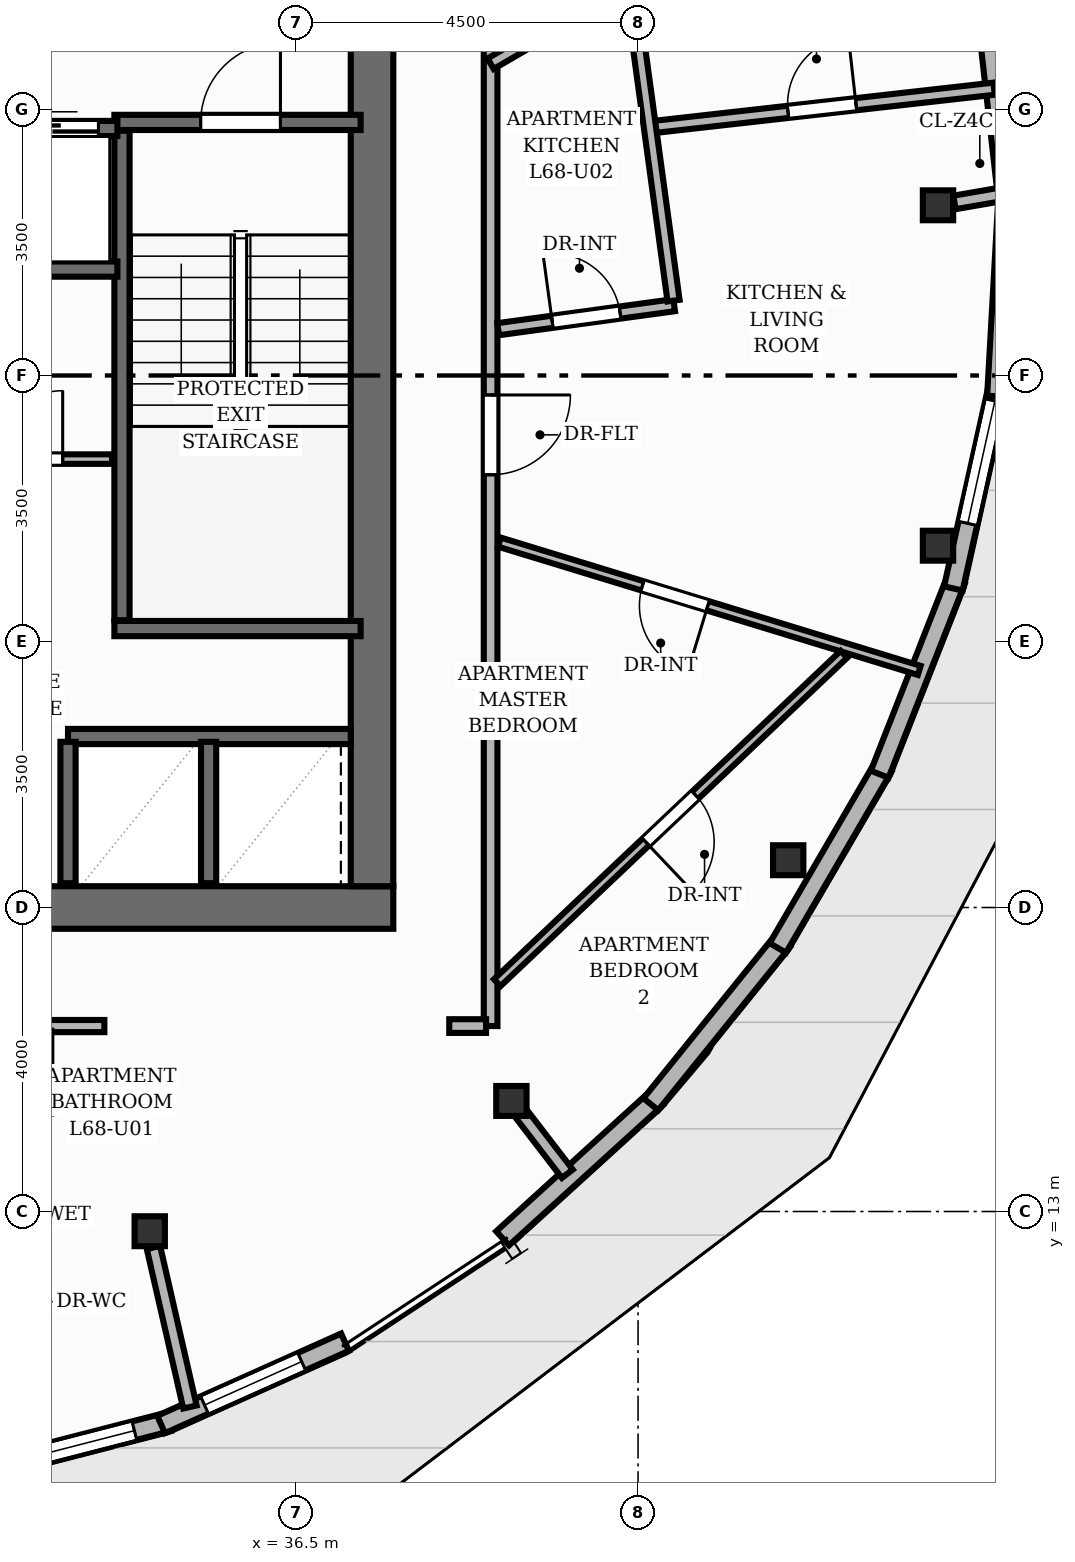
"""IFC4 building model, lengths in metres.
Left out: names, types, materials, properties, quantities, classifications, styles, units other than length and angle.
Written with IfcOpenShell. Run it as: python <this file> out.ifc"""

import sys

from ifc_helpers import new_model, si_unit, direction, frame, frame_2d, origin, origin_2d, place, context, subcontext, project, spatial, rectangle, i_section, extrude, element, fill, save


model = new_model("IFC4")
c1 = context("Model", 3, precision=1e-05, world=origin(), true_north=direction((0.0, 1.0)))
c2 = subcontext(c1, "Body", "Model", "MODEL_VIEW")
j1 = project(units=[si_unit("LENGTHUNIT", "METRE"), si_unit("PLANEANGLEUNIT", "RADIAN")], contexts=[c1])
p1 = place(None, origin())
s1 = spatial("IfcSite", under=j1, at=p1, CompositionType="ELEMENT")
p2 = place(p1, origin())
s2 = spatial("IfcBuilding", under=s1, at=p2, CompositionType="ELEMENT")
p3 = place(p2, frame((0.0, 0.0, 227.04)))
s3 = spatial("IfcBuildingStorey", under=s2, at=p3, CompositionType="ELEMENT", Elevation=227.04)
p4 = place(p3, frame((26.22, 17.0, 0.0), z_axis=(0.0, 0.0, 1.0), x_axis=(1.0, 0.0, 0.0)))
e1 = element("IfcWall", 1, at=p4, inside=s3, PredefinedType="SHEAR", context=c2, shape_type="SweptSolid", body=[
    extrude(rectangle(XDim=11.56, YDim=0.56, at=frame_2d((5.78, 0.0))), origin(), (0.0, 0.0, 1.0), 3.2),
])
p5 = place(p4, frame((2.28, 0.0, 0.0)))
e2 = element("IfcOpeningElement", 2, at=p5, cuts=e1, PredefinedType="OPENING", context=c2, shape_type="SweptSolid", body=[
    extrude(rectangle(XDim=1.1, YDim=2.15, at=frame_2d((0.55, 1.075))), frame((0.0, 0.29, 0.0), z_axis=(0.0, -1.0, 0.0), x_axis=(1.0, 0.0, 0.0)), (0.0, 0.0, 1.0), 0.58),
])
p6 = place(p4, frame((5.83, 0.0, 0.0)))
e3 = element("IfcOpeningElement", 3, at=p6, cuts=e1, PredefinedType="OPENING", context=c2, shape_type="SweptSolid", body=[
    extrude(rectangle(XDim=0.9, YDim=2.1, at=frame_2d((0.45, 1.05))), frame((0.0, 0.29, 0.0), z_axis=(0.0, -1.0, 0.0), x_axis=(1.0, 0.0, 0.0)), (0.0, 0.0, 1.0), 0.58),
])
p7 = place(p3, frame((37.5, 17.28, 0.0), z_axis=(0.0, 0.0, 1.0), x_axis=(0.0, 1.0, 0.0)))
e4 = element("IfcWall", 4, at=p7, inside=s3, PredefinedType="SHEAR", context=c2, shape_type="SweptSolid", body=[
    extrude(rectangle(XDim=13.44, YDim=0.56, at=frame_2d((6.72, 0.0))), origin(), (0.0, 0.0, 1.0), 3.2),
])
for number, where, z_axis, x_axis in (
    (5, (44.946, 26.24, 0.0), (0.0, 0.0, 1.0), (1.0, 0.0, 0.0)),
    (6, (34.575, 12.74, 0.0), (0.0, 0.0, 1.0), (1.0, 0.0, 0.0)),
    (7, (39.333, 14.455, 0.0), (0.0, 0.0, 1.0), (1.0, 0.0, 0.0)),
    (8, (42.975, 17.622, 0.0), (0.0, 0.0, 1.0), (1.0, 0.0, 0.0)),
    (9, (44.946, 21.76, 0.0), (0.0, 0.0, 1.0), (1.0, 0.0, 0.0)),
):
    element("IfcColumn", number, at=place(p3, frame(where, z_axis=z_axis, x_axis=x_axis)), inside=s3, PredefinedType="COLUMN", context=c2, shape_type="SweptSolid", body=[
        extrude(i_section(OverallWidth=0.399, OverallDepth=0.394, WebThickness=0.023, FlangeThickness=0.037, at=origin_2d()), origin(), (0.0, 0.0, 1.0), 3.2),
    ])
p8 = place(p3, frame((34.829, 10.234, 0.0), z_axis=(0.0, 0.0, 1.0), x_axis=(-0.968423445169, -0.249311112562, 0.0)))
e10 = element("IfcWall", 10, at=p8, inside=s3, PredefinedType="SOLIDWALL", context=c2, shape_type="SweptSolid", body=[
    extrude(rectangle(XDim=2.592, YDim=0.25, at=frame_2d((1.296, 0.0))), origin(), (0.0, 0.0, 1.0), 2.96),
])
p9 = place(p8, frame((0.471, 0.0, 0.85)))
e11 = element("IfcOpeningElement", 11, at=p9, cuts=e10, PredefinedType="OPENING", context=c2, shape_type="SweptSolid", body=[
    extrude(rectangle(XDim=1.65, YDim=1.55, at=frame_2d((0.825, 0.775))), frame((0.0, 0.135, 0.0), z_axis=(0.0, -1.0, 0.0), x_axis=(1.0, 0.0, 0.0)), (0.0, 0.0, 1.0), 0.27),
])
p10 = place(p3, frame((37.145, 11.281, 0.0), z_axis=(0.0, 0.0, 1.0), x_axis=(-0.912779399898, -0.408452894617, 0.0)))
e12 = element("IfcWall", 12, at=p10, inside=s3, PredefinedType="SOLIDWALL", context=c2, shape_type="SweptSolid", body=[
    extrude(rectangle(XDim=2.651, YDim=0.25, at=frame_2d((1.325, 0.0))), origin(), (0.0, 0.0, 1.0), 2.96),
])
p11 = place(p10, frame((0.625, 0.0, 0.85)))
e13 = element("IfcOpeningElement", 13, at=p11, cuts=e12, PredefinedType="OPENING", context=c2, shape_type="SweptSolid", body=[
    extrude(rectangle(XDim=1.4, YDim=1.52, at=frame_2d((0.7, 0.76))), frame((0.0, 0.135, 0.0), z_axis=(0.0, -1.0, 0.0), x_axis=(1.0, 0.0, 0.0)), (0.0, 0.0, 1.0), 0.27),
])
p12 = place(p3, frame((41.243, 14.49, 0.0), z_axis=(0.0, 0.0, 1.0), x_axis=(-0.739366950434, -0.673302690182, 0.0)))
e14 = element("IfcWall", 14, at=p12, inside=s3, PredefinedType="SOLIDWALL", context=c2, shape_type="SweptSolid", body=[
    extrude(rectangle(XDim=2.738, YDim=0.25, at=frame_2d((1.369, 0.0))), origin(), (0.0, 0.0, 1.0), 2.96),
])
p13 = place(p3, frame((42.9, 16.558, 0.0), z_axis=(0.0, 0.0, 1.0), x_axis=(-0.628046541479, -0.778175778174, 0.0)))
e15 = element("IfcWall", 15, at=p13, inside=s3, PredefinedType="SOLIDWALL", context=c2, shape_type="SweptSolid", body=[
    extrude(rectangle(XDim=2.758, YDim=0.25, at=frame_2d((1.379, 0.0))), origin(), (0.0, 0.0, 1.0), 2.96),
])
p14 = place(p3, frame((44.227, 18.851, 0.0), z_axis=(0.0, 0.0, 1.0), x_axis=(-0.503177339128, -0.864183178144, 0.0)))
e16 = element("IfcWall", 16, at=p14, inside=s3, PredefinedType="SOLIDWALL", context=c2, shape_type="SweptSolid", body=[
    extrude(rectangle(XDim=2.758, YDim=0.25, at=frame_2d((1.379, 0.0))), origin(), (0.0, 0.0, 1.0), 2.96),
])
p15 = place(p3, frame((45.18, 21.302, 0.0), z_axis=(0.0, 0.0, 1.0), x_axis=(-0.365588934877, -0.930776412838, 0.0)))
e17 = element("IfcWall", 17, at=p15, inside=s3, PredefinedType="SOLIDWALL", context=c2, shape_type="SweptSolid", body=[
    extrude(rectangle(XDim=2.739, YDim=0.25, at=frame_2d((1.369, 0.0))), origin(), (0.0, 0.0, 1.0), 2.577),
])
p16 = place(p3, frame((45.733, 23.836, 0.0), z_axis=(0.0, 0.0, 1.0), x_axis=(-0.21633718885, -0.976318708579, 0.0)))
e18 = element("IfcWall", 18, at=p16, inside=s3, PredefinedType="SOLIDWALL", context=c2, shape_type="SweptSolid", body=[
    extrude(rectangle(XDim=2.702, YDim=0.25, at=frame_2d((1.351, 0.0))), origin(), (0.0, 0.0, 1.0), 2.577),
])
p17 = place(p16, frame((0.175, 0.0, 0.85)))
e19 = element("IfcOpeningElement", 19, at=p17, cuts=e18, PredefinedType="OPENING", context=c2, shape_type="SweptSolid", body=[
    extrude(rectangle(XDim=1.65, YDim=1.55, at=frame_2d((0.825, 0.775))), frame((0.0, 0.135, 0.0), z_axis=(0.0, -1.0, 0.0), x_axis=(1.0, 0.0, 0.0)), (0.0, 0.0, 1.0), 0.27),
])
p18 = place(p3, frame((45.867, 26.374, 0.0), z_axis=(0.0, 0.0, 1.0), x_axis=(-0.056270814174, -0.998415542483, 0.0)))
e20 = element("IfcWall", 20, at=p18, inside=s3, PredefinedType="SOLIDWALL", context=c2, shape_type="SweptSolid", body=[
    extrude(rectangle(XDim=2.651, YDim=0.25, at=frame_2d((1.325, 0.0))), origin(), (0.0, 0.0, 1.0), 2.96),
])
p19 = place(p3, frame((45.579, 28.839, 0.0), z_axis=(0.0, 0.0, 1.0), x_axis=(0.112260931198, -0.993678762642, 0.0)))
e21 = element("IfcWall", 21, at=p19, inside=s3, PredefinedType="SOLIDWALL", context=c2, shape_type="SweptSolid", body=[
    extrude(rectangle(XDim=2.592, YDim=0.25, at=frame_2d((1.296, 0.0))), origin(), (0.0, 0.0, 1.0), 2.96),
])
p20 = place(p3, frame((34.21, 20.78, 0.0), z_axis=(0.0, 0.0, 1.0), x_axis=(0.0, 1.0, 0.0)))
e22 = element("IfcWall", 22, at=p20, inside=s3, PredefinedType="SHEAR", context=c2, shape_type="SweptSolid", body=[
    extrude(rectangle(XDim=6.44, YDim=0.2, at=frame_2d((3.22, 0.0))), origin(), (0.0, 0.0, 1.0), 3.2),
])
p21 = place(p3, frame((34.11, 20.67, 0.0), z_axis=(0.0, 0.0, 1.0), x_axis=(1.0, 0.0, 0.0)))
e23 = element("IfcWall", 23, at=p21, inside=s3, PredefinedType="SHEAR", context=c2, shape_type="SweptSolid", body=[
    extrude(rectangle(XDim=3.24, YDim=0.2, at=frame_2d((1.62, 0.0))), origin(), (0.0, 0.0, 1.0), 3.2),
])
p22 = place(p3, frame((34.11, 27.33, 0.0), z_axis=(0.0, 0.0, 1.0), x_axis=(1.0, 0.0, 0.0)))
e24 = element("IfcWall", 24, at=p22, inside=s3, PredefinedType="SHEAR", context=c2, shape_type="SweptSolid", body=[
    extrude(rectangle(XDim=3.24, YDim=0.2, at=frame_2d((1.62, 0.0))), origin(), (0.0, 0.0, 1.0), 3.2),
])
p23 = place(p22, frame((1.135, 0.0, 0.0)))
e25 = element("IfcOpeningElement", 25, at=p23, cuts=e24, PredefinedType="OPENING", context=c2, shape_type="SweptSolid", body=[
    extrude(rectangle(XDim=1.05, YDim=2.15, at=frame_2d((0.525, 1.075))), frame((0.0, 0.11, 0.0), z_axis=(0.0, -1.0, 0.0), x_axis=(1.0, 0.0, 0.0)), (0.0, 0.0, 1.0), 0.22),
])
p24 = place(p3, frame((31.85, 27.25, 0.0), z_axis=(0.0, 0.0, 1.0), x_axis=(1.0, 0.0, 0.0)))
e26 = element("IfcWall", 26, at=p24, inside=s3, PredefinedType="SHEAR", context=c2, shape_type="SweptSolid", body=[
    extrude(rectangle(XDim=2.3, YDim=0.2, at=frame_2d((1.15, 0.0))), origin(), (0.0, 0.0, 1.0), 3.2),
])
p25 = place(p24, frame((0.95, 0.0, 0.0)))
e27 = element("IfcOpeningElement", 27, at=p25, cuts=e26, PredefinedType="OPENING", context=c2, shape_type="SweptSolid", body=[
    extrude(rectangle(XDim=1.1, YDim=2.15, at=frame_2d((0.55, 1.075))), frame((0.0, 0.11, 0.0), z_axis=(0.0, -1.0, 0.0), x_axis=(1.0, 0.0, 0.0)), (0.0, 0.0, 1.0), 0.22),
])
p26 = place(p3, frame((31.85, 25.4, 0.0), z_axis=(0.0, 0.0, 1.0), x_axis=(1.0, 0.0, 0.0)))
e28 = element("IfcWall", 28, at=p26, inside=s3, PredefinedType="SHEAR", context=c2, shape_type="SweptSolid", body=[
    extrude(rectangle(XDim=2.3, YDim=0.2, at=frame_2d((1.15, 0.0))), origin(), (0.0, 0.0, 1.0), 3.2),
])
p27 = place(p3, frame((33.5, 19.25, 0.0), z_axis=(0.0, 0.0, 1.0), x_axis=(1.0, 0.0, 0.0)))
e29 = element("IfcWall", 29, at=p27, inside=s3, PredefinedType="SHEAR", context=c2, shape_type="SweptSolid", body=[
    extrude(rectangle(XDim=3.72, YDim=0.2, at=frame_2d((1.86, 0.0))), origin(), (0.0, 0.0, 1.0), 3.2),
])
for number, where, z_axis, x_axis in (
    (30, (33.5, 17.32, 0.0), (0.0, 0.0, 1.0), (0.0, 1.0, 0.0)),
    (31, (35.35, 17.32, 0.0), (0.0, 0.0, 1.0), (0.0, 1.0, 0.0)),
):
    element("IfcWall", number, at=place(p3, frame(where, z_axis=z_axis, x_axis=x_axis)), inside=s3, PredefinedType="SHEAR", context=c2, shape_type="SweptSolid", body=[
        extrude(rectangle(XDim=1.86, YDim=0.2, at=frame_2d((0.93, 0.0))), origin(), (0.0, 0.0, 1.0), 3.2),
    ])
p28 = place(p3, frame((32.22, 22.9, 0.0), z_axis=(0.0, 0.0, 1.0), x_axis=(1.0, 0.0, 0.0)))
e32 = element("IfcWall", 32, at=p28, inside=s3, PredefinedType="PARTITIONING", context=c2, shape_type="SweptSolid", body=[
    extrude(rectangle(XDim=1.86, YDim=0.125, at=frame_2d((0.93, 0.0))), origin(), (0.0, 0.0, 1.0), 2.955),
])
p29 = place(p28, frame((0.31, 0.0, 0.0)))
e33 = element("IfcOpeningElement", 33, at=p29, cuts=e32, PredefinedType="OPENING", context=c2, shape_type="SweptSolid", body=[
    extrude(rectangle(XDim=0.9, YDim=2.1, at=frame_2d((0.45, 1.05))), frame((0.0, 0.073, 0.0), z_axis=(0.0, -1.0, 0.0), x_axis=(1.0, 0.0, 0.0)), (0.0, 0.0, 1.0), 0.145),
])
p30 = place(p3, frame((45.163, 26.277, 0.0), z_axis=(0.0, 0.0, 1.0), x_axis=(0.985377293822, 0.170386586384, 0.0)))
e34 = element("IfcWall", 34, at=p30, inside=s3, PredefinedType="PARTITIONING", context=c2, shape_type="SweptSolid", body=[
    extrude(rectangle(XDim=0.648, YDim=0.18, at=frame_2d((0.324, 0.0))), origin(), (0.0, 0.0, 1.0), 2.403),
])
p31 = place(p3, frame((34.624, 12.527, 0.0), z_axis=(0.0, 0.0, 1.0), x_axis=(0.223037236672, -0.974809925605, 0.0)))
e35 = element("IfcWall", 35, at=p31, inside=s3, PredefinedType="PARTITIONING", context=c2, shape_type="SweptSolid", body=[
    extrude(rectangle(XDim=2.153, YDim=0.18, at=frame_2d((1.077, 0.0))), origin(), (0.0, 0.0, 1.0), 2.403),
])
p32 = place(p3, frame((39.467, 14.281, 0.0), z_axis=(0.0, 0.0, 1.0), x_axis=(0.609245199708, -0.792981895526, 0.0)))
e36 = element("IfcWall", 36, at=p32, inside=s3, PredefinedType="PARTITIONING", context=c2, shape_type="SweptSolid", body=[
    extrude(rectangle(XDim=0.989, YDim=0.18, at=frame_2d((0.494, 0.0))), origin(), (0.0, 0.0, 1.0), 2.403),
])
p33 = place(p3, frame((33.978, 15.44, 0.0), z_axis=(0.0, 0.0, 1.0), x_axis=(-1.0, 0.0, 0.0)))
e37 = element("IfcWall", 37, at=p33, inside=s3, PredefinedType="PLUMBINGWALL", context=c2, shape_type="SweptSolid", body=[
    extrude(rectangle(XDim=0.778, YDim=0.16, at=frame_2d((0.389, 0.0))), origin(), (0.0, 0.0, 1.0), 2.955),
])
p34 = place(p3, frame((39.06, 32.56, 0.0), z_axis=(0.0, 0.0, 1.0), x_axis=(0.0, -1.0, 0.0)))
e38 = element("IfcWall", 38, at=p34, inside=s3, PredefinedType="PARTITIONING", context=c2, shape_type="SweptSolid", body=[
    extrude(rectangle(XDim=17.12, YDim=0.18, at=frame_2d((8.56, 0.0))), origin(), (0.0, 0.0, 1.0), 2.955),
])
p35 = place(p34, frame((8.816, 0.0, 0.0)))
e39 = element("IfcOpeningElement", 39, at=p35, cuts=e38, PredefinedType="OPENING", context=c2, shape_type="SweptSolid", body=[
    extrude(rectangle(XDim=1.05, YDim=2.15, at=frame_2d((0.525, 1.075))), frame((0.0, 0.1, 0.0), z_axis=(0.0, -1.0, 0.0), x_axis=(1.0, 0.0, 0.0)), (0.0, 0.0, 1.0), 0.2),
])
p36 = place(p3, frame((39.0, 15.44, 0.0), z_axis=(0.0, 0.0, 1.0), x_axis=(-1.0, 0.0, 0.0)))
e40 = element("IfcWall", 40, at=p36, inside=s3, PredefinedType="PARTITIONING", context=c2, shape_type="SweptSolid", body=[
    extrude(rectangle(XDim=0.484, YDim=0.18, at=frame_2d((0.242, 0.0))), origin(), (0.0, 0.0, 1.0), 2.955),
])
p37 = place(p3, frame((41.156, 27.264, 0.0), z_axis=(0.0, 0.0, 1.0), x_axis=(0.993729232793, 0.111813290319, 0.0)))
e41 = element("IfcWall", 41, at=p37, inside=s3, PredefinedType="PLUMBINGWALL", context=c2, shape_type="SweptSolid", body=[
    extrude(rectangle(XDim=4.557, YDim=0.16, at=frame_2d((2.278, 0.0))), origin(), (0.0, 0.0, 1.0), 2.692),
])
p38 = place(p37, frame((1.828, 0.0, 0.0)))
e42 = element("IfcOpeningElement", 42, at=p38, cuts=e41, PredefinedType="OPENING", context=c2, shape_type="SweptSolid", body=[
    extrude(rectangle(XDim=0.9, YDim=2.1, at=frame_2d((0.45, 1.05))), frame((0.0, 0.09, 0.0), z_axis=(0.0, -1.0, 0.0), x_axis=(1.0, 0.0, 0.0)), (0.0, 0.0, 1.0), 0.18),
])
p39 = place(p3, frame((44.7, 20.12, 0.0), z_axis=(0.0, 0.0, 1.0), x_axis=(-0.956360100331, 0.292190620136, 0.0)))
e43 = element("IfcWall", 43, at=p39, inside=s3, PredefinedType="PARTITIONING", context=c2, shape_type="SweptSolid", body=[
    extrude(rectangle(XDim=5.777, YDim=0.125, at=frame_2d((2.889, 0.0))), origin(), (0.0, 0.0, 1.0), 2.692),
])
p40 = place(p39, frame((2.909, 0.0, 0.0)))
e44 = element("IfcOpeningElement", 44, at=p40, cuts=e43, PredefinedType="OPENING", context=c2, shape_type="SweptSolid", body=[
    extrude(rectangle(XDim=0.9, YDim=2.1, at=frame_2d((0.45, 1.05))), frame((0.0, 0.073, 0.0), z_axis=(0.0, -1.0, 0.0), x_axis=(1.0, 0.0, 0.0)), (0.0, 0.0, 1.0), 0.145),
])
p41 = place(p3, frame((39.159, 24.609, 0.0), z_axis=(0.0, 0.0, 1.0), x_axis=(0.990809817729, 0.135262356521, 0.0)))
e45 = element("IfcWall", 45, at=p41, inside=s3, PredefinedType="PLUMBINGWALL", context=c2, shape_type="SweptSolid", body=[
    extrude(rectangle(XDim=2.337, YDim=0.16, at=frame_2d((1.169, 0.0))), origin(), (0.0, 0.0, 1.0), 2.692),
])
p42 = place(p41, frame((0.719, 0.0, 0.0)))
e46 = element("IfcOpeningElement", 46, at=p42, cuts=e45, PredefinedType="OPENING", context=c2, shape_type="SweptSolid", body=[
    extrude(rectangle(XDim=0.9, YDim=2.1, at=frame_2d((0.45, 1.05))), frame((0.0, 0.09, 0.0), z_axis=(0.0, -1.0, 0.0), x_axis=(1.0, 0.0, 0.0)), (0.0, 0.0, 1.0), 0.18),
])
p43 = place(p3, frame((41.467, 24.985, 0.0), z_axis=(0.0, 0.0, 1.0), x_axis=(-0.135203486235, 0.990817852741, 0.0)))
e47 = element("IfcWall", 47, at=p43, inside=s3, PredefinedType="PLUMBINGWALL", context=c2, shape_type="SweptSolid", body=[
    extrude(rectangle(XDim=4.224, YDim=0.16, at=frame_2d((2.112, 0.0))), origin(), (0.0, 0.0, 1.0), 2.955),
])
p44 = place(p3, frame((39.06, 28.103, 0.0), z_axis=(0.0, 0.0, 1.0), x_axis=(0.864584371019, 0.502487676854, 0.0)))
e48 = element("IfcWall", 48, at=p44, inside=s3, PredefinedType="PLUMBINGWALL", context=c2, shape_type="SweptSolid", body=[
    extrude(rectangle(XDim=4.314, YDim=0.16, at=frame_2d((2.157, 0.0))), origin(), (0.0, 0.0, 1.0), 2.403),
])
p45 = place(p3, frame((43.708, 20.332, 0.0), z_axis=(0.0, 0.0, 1.0), x_axis=(-0.72596595756, -0.68773063656, 0.0)))
e49 = element("IfcWall", 49, at=p45, inside=s3, PredefinedType="PARTITIONING", context=c2, shape_type="SweptSolid", body=[
    extrude(rectangle(XDim=6.283, YDim=0.125, at=frame_2d((3.142, 0.0))), origin(), (0.0, 0.0, 1.0), 2.955),
])
p46 = place(p45, frame((2.692, 0.0, 0.0)))
e50 = element("IfcOpeningElement", 50, at=p46, cuts=e49, PredefinedType="OPENING", context=c2, shape_type="SweptSolid", body=[
    extrude(rectangle(XDim=0.9, YDim=2.1, at=frame_2d((0.45, 1.05))), frame((0.0, 0.073, 0.0), z_axis=(0.0, -1.0, 0.0), x_axis=(1.0, 0.0, 0.0)), (0.0, 0.0, 1.0), 0.145),
])
p47 = place(p9, origin())
e51 = element("IfcWindow", 51, at=p47, inside=s3, PartitioningType="SINGLE_PANEL", PredefinedType="WINDOW", context=c2, shape_type="SweptSolid", body=[
    extrude(rectangle(XDim=1.65, YDim=1.55, at=frame_2d((0.825, 0.775))), frame((0.0, 0.03, 0.0), z_axis=(0.0, -1.0, 0.0), x_axis=(1.0, 0.0, 0.0)), (0.0, 0.0, 1.0), 0.06),
])
fill(e11, e51)
p48 = place(p11, origin())
e52 = element("IfcWindow", 52, at=p48, inside=s3, PartitioningType="SINGLE_PANEL", PredefinedType="WINDOW", context=c2, shape_type="SweptSolid", body=[
    extrude(rectangle(XDim=1.4, YDim=1.52, at=frame_2d((0.7, 0.76))), frame((0.0, 0.03, 0.0), z_axis=(0.0, -1.0, 0.0), x_axis=(1.0, 0.0, 0.0)), (0.0, 0.0, 1.0), 0.06),
])
fill(e13, e52)
p49 = place(p17, origin())
e53 = element("IfcWindow", 53, at=p49, inside=s3, PartitioningType="SINGLE_PANEL", PredefinedType="WINDOW", context=c2, shape_type="SweptSolid", body=[
    extrude(rectangle(XDim=1.65, YDim=1.55, at=frame_2d((0.825, 0.775))), frame((0.0, 0.03, 0.0), z_axis=(0.0, -1.0, 0.0), x_axis=(1.0, 0.0, 0.0)), (0.0, 0.0, 1.0), 0.06),
])
fill(e19, e53)
p50 = place(p23, origin())
e54 = element("IfcDoor", 54, at=p50, inside=s3, OperationType="SINGLE_SWING_RIGHT", PredefinedType="DOOR", context=c2, shape_type="SweptSolid", body=[
    extrude(rectangle(XDim=1.05, YDim=2.15, at=frame_2d((0.525, 1.075))), frame((0.0, 0.025, 0.0), z_axis=(0.0, -1.0, 0.0), x_axis=(1.0, 0.0, 0.0)), (0.0, 0.0, 1.0), 0.05),
])
fill(e25, e54)
p51 = place(p25, origin())
e55 = element("IfcDoor", 55, at=p51, inside=s3, OperationType="DOUBLE_DOOR_SLIDING", PredefinedType="DOOR", context=c2, shape_type="SweptSolid", body=[
    extrude(rectangle(XDim=1.1, YDim=2.15, at=frame_2d((0.55, 1.075))), frame((0.0, 0.025, 0.0), z_axis=(0.0, -1.0, 0.0), x_axis=(1.0, 0.0, 0.0)), (0.0, 0.0, 1.0), 0.05),
])
fill(e27, e55)
p52 = place(p29, origin())
e56 = element("IfcDoor", 56, at=p52, inside=s3, OperationType="SINGLE_SWING_RIGHT", PredefinedType="DOOR", context=c2, shape_type="SweptSolid", body=[
    extrude(rectangle(XDim=0.9, YDim=2.1, at=frame_2d((0.45, 1.05))), frame((0.0, 0.025, 0.0), z_axis=(0.0, -1.0, 0.0), x_axis=(1.0, 0.0, 0.0)), (0.0, 0.0, 1.0), 0.05),
])
fill(e33, e56)
p53 = place(p35, origin())
e57 = element("IfcDoor", 57, at=p53, inside=s3, OperationType="SINGLE_SWING_LEFT", PredefinedType="DOOR", context=c2, shape_type="SweptSolid", body=[
    extrude(rectangle(XDim=1.05, YDim=2.15, at=frame_2d((0.525, 1.075))), frame((0.0, 0.025, 0.0), z_axis=(0.0, -1.0, 0.0), x_axis=(1.0, 0.0, 0.0)), (0.0, 0.0, 1.0), 0.05),
])
fill(e39, e57)
p54 = place(p38, origin())
e58 = element("IfcDoor", 58, at=p54, inside=s3, OperationType="SINGLE_SWING_RIGHT", PredefinedType="DOOR", context=c2, shape_type="SweptSolid", body=[
    extrude(rectangle(XDim=0.9, YDim=2.1, at=frame_2d((0.45, 1.05))), frame((0.0, 0.025, 0.0), z_axis=(0.0, -1.0, 0.0), x_axis=(1.0, 0.0, 0.0)), (0.0, 0.0, 1.0), 0.05),
])
fill(e42, e58)
p55 = place(p40, origin())
e59 = element("IfcDoor", 59, at=p55, inside=s3, OperationType="SINGLE_SWING_LEFT", PredefinedType="DOOR", context=c2, shape_type="SweptSolid", body=[
    extrude(rectangle(XDim=0.9, YDim=2.1, at=frame_2d((0.45, 1.05))), frame((0.0, 0.025, 0.0), z_axis=(0.0, -1.0, 0.0), x_axis=(1.0, 0.0, 0.0)), (0.0, 0.0, 1.0), 0.05),
])
fill(e44, e59)
p56 = place(p46, origin())
e60 = element("IfcDoor", 60, at=p56, inside=s3, OperationType="SINGLE_SWING_RIGHT", PredefinedType="DOOR", context=c2, shape_type="SweptSolid", body=[
    extrude(rectangle(XDim=0.9, YDim=2.1, at=frame_2d((0.45, 1.05))), frame((0.0, 0.025, 0.0), z_axis=(0.0, -1.0, 0.0), x_axis=(1.0, 0.0, 0.0)), (0.0, 0.0, 1.0), 0.05),
])
fill(e50, e60)
p57 = place(p42, origin())
e61 = element("IfcDoor", 61, at=p57, inside=s3, OperationType="SINGLE_SWING_LEFT", PredefinedType="DOOR", context=c2, shape_type="SweptSolid", body=[
    extrude(rectangle(XDim=0.9, YDim=2.1, at=frame_2d((0.45, 1.05))), frame((0.0, 0.025, 0.0), z_axis=(0.0, -1.0, 0.0), x_axis=(1.0, 0.0, 0.0)), (0.0, 0.0, 1.0), 0.05),
])
fill(e46, e61)
save(model, sys.argv[1])
